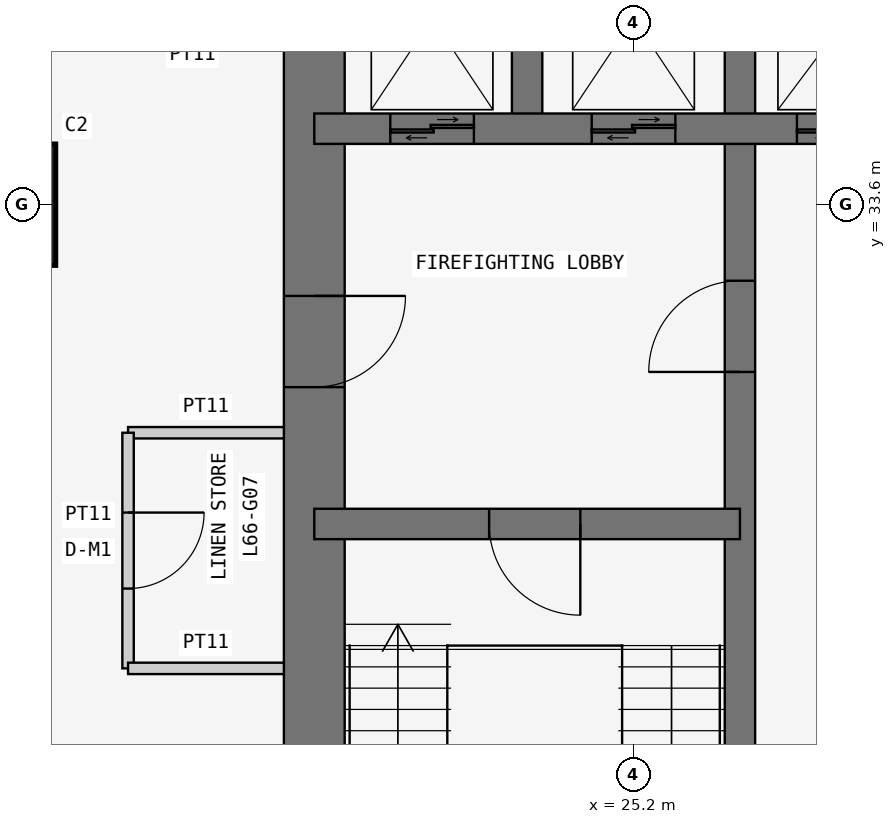
"""IFC4 building model, lengths in metres.
Left out: names, types, materials, properties, quantities, classifications, styles, units other than length and angle.
Written with IfcOpenShell. Run it as: python <this file> out.ifc"""

import sys

from ifc_helpers import new_model, si_unit, direction, frame, frame_2d, origin, origin_2d, place, context, subcontext, project, spatial, rectangle, extrude, element, fill, save


model = new_model("IFC4")
c1 = context("Model", 3, precision=1e-05, world=origin(), true_north=direction((0.0, 1.0)))
c2 = subcontext(c1, "Body", "Model", "MODEL_VIEW")
j1 = project(units=[si_unit("LENGTHUNIT", "METRE"), si_unit("PLANEANGLEUNIT", "RADIAN")], contexts=[c1])
p1 = place(None, origin())
s1 = spatial("IfcSite", under=j1, at=p1, CompositionType="ELEMENT")
p2 = place(p1, origin())
s2 = spatial("IfcBuilding", under=s1, at=p2, CompositionType="ELEMENT")
p3 = place(p2, frame((0.0, 0.0, 254.1)))
s3 = spatial("IfcBuildingStorey", under=s2, at=p3, CompositionType="ELEMENT", Elevation=254.1)
p4 = place(p3, frame((16.8, 33.6, 0.0), z_axis=(0.0, 0.0, 1.0), x_axis=(1.0, 0.0, 0.0)))
e1 = element("IfcColumn", 1, at=p4, inside=s3, PredefinedType="COLUMN", context=c2, shape_type="SweptSolid", body=[
    extrude(rectangle(XDim=1.6, YDim=1.6, at=origin_2d()), origin(), (0.0, 0.0, 1.0), 3.6),
])
p5 = place(p3, frame((21.0, 37.8, 0.0), z_axis=(0.0, 0.0, 1.0), x_axis=(0.0, -1.0, 0.0)))
e2 = element("IfcWall", 2, at=p5, inside=s3, PredefinedType="SHEAR", context=c2, shape_type="SweptSolid", body=[
    extrude(rectangle(XDim=17.2, YDim=0.8, at=frame_2d((8.6, 0.0))), origin(), (0.0, 0.0, 1.0), 3.6),
])
p6 = place(p5, frame((5.4, 0.0, 0.0)))
e3 = element("IfcOpeningElement", 3, at=p6, cuts=e2, PredefinedType="OPENING", context=c2, shape_type="SweptSolid", body=[
    extrude(rectangle(XDim=1.2, YDim=2.1, at=frame_2d((0.6, 1.05))), frame((0.0, 0.41, 0.0), z_axis=(0.0, -1.0, 0.0), x_axis=(1.0, 0.0, 0.0)), (0.0, 0.0, 1.0), 0.82),
])
p7 = place(p3, frame((26.6, 21.0, 0.0), z_axis=(0.0, 0.0, 1.0), x_axis=(0.0, 1.0, 0.0)))
e4 = element("IfcWall", 4, at=p7, inside=s3, PredefinedType="SHEAR", context=c2, shape_type="SweptSolid", body=[
    extrude(rectangle(XDim=16.8, YDim=0.4, at=frame_2d((8.4, 0.0))), origin(), (0.0, 0.0, 1.0), 3.6),
])
p8 = place(p7, frame((10.4, 0.0, 0.0)))
e5 = element("IfcOpeningElement", 5, at=p8, cuts=e4, PredefinedType="OPENING", context=c2, shape_type="SweptSolid", body=[
    extrude(rectangle(XDim=1.2, YDim=2.1, at=frame_2d((0.6, 1.05))), frame((0.0, 0.21, 0.0), z_axis=(0.0, -1.0, 0.0), x_axis=(1.0, 0.0, 0.0)), (0.0, 0.0, 1.0), 0.42),
])
p9 = place(p3, frame((21.0, 29.4, 0.0), z_axis=(0.0, 0.0, 1.0), x_axis=(1.0, 0.0, 0.0)))
e6 = element("IfcWall", 6, at=p9, inside=s3, PredefinedType="SHEAR", context=c2, shape_type="SweptSolid", body=[
    extrude(rectangle(XDim=5.6, YDim=0.4, at=frame_2d((2.8, 0.0))), origin(), (0.0, 0.0, 1.0), 3.6),
])
p10 = place(p9, frame((2.3, 0.0, 0.0)))
e7 = element("IfcOpeningElement", 7, at=p10, cuts=e6, PredefinedType="OPENING", context=c2, shape_type="SweptSolid", body=[
    extrude(rectangle(XDim=1.2, YDim=2.1, at=frame_2d((0.6, 1.05))), frame((0.0, 0.21, 0.0), z_axis=(0.0, -1.0, 0.0), x_axis=(1.0, 0.0, 0.0)), (0.0, 0.0, 1.0), 0.42),
])
p11 = place(p3, frame((21.0, 34.6, 0.0), z_axis=(0.0, 0.0, 1.0), x_axis=(1.0, 0.0, 0.0)))
e8 = element("IfcWall", 8, at=p11, inside=s3, PredefinedType="SHEAR", context=c2, shape_type="SweptSolid", body=[
    extrude(rectangle(XDim=11.2, YDim=0.4, at=frame_2d((5.6, 0.0))), origin(), (0.0, 0.0, 1.0), 3.6),
])
p12 = place(p11, frame((9.35, 0.0, 0.0)))
e9 = element("IfcOpeningElement", 9, at=p12, cuts=e8, PredefinedType="OPENING", context=c2, shape_type="SweptSolid", body=[
    extrude(rectangle(XDim=0.9, YDim=2.1, at=frame_2d((0.45, 1.05))), frame((0.0, 0.21, 0.0), z_axis=(0.0, -1.0, 0.0), x_axis=(1.0, 0.0, 0.0)), (0.0, 0.0, 1.0), 0.42),
])
p13 = place(p11, frame((1.0, 0.0, 0.0)))
e10 = element("IfcOpeningElement", 10, at=p13, cuts=e8, PredefinedType="OPENING", context=c2, shape_type="SweptSolid", body=[
    extrude(rectangle(XDim=1.1, YDim=2.1, at=frame_2d((0.55, 1.05))), frame((0.0, 0.21, 0.0), z_axis=(0.0, -1.0, 0.0), x_axis=(1.0, 0.0, 0.0)), (0.0, 0.0, 1.0), 0.42),
])
p14 = place(p11, frame((3.65, 0.0, 0.0)))
e11 = element("IfcOpeningElement", 11, at=p14, cuts=e8, PredefinedType="OPENING", context=c2, shape_type="SweptSolid", body=[
    extrude(rectangle(XDim=1.1, YDim=2.1, at=frame_2d((0.55, 1.05))), frame((0.0, 0.21, 0.0), z_axis=(0.0, -1.0, 0.0), x_axis=(1.0, 0.0, 0.0)), (0.0, 0.0, 1.0), 0.42),
])
p15 = place(p11, frame((6.35, 0.0, 0.0)))
e12 = element("IfcOpeningElement", 12, at=p15, cuts=e8, PredefinedType="OPENING", context=c2, shape_type="SweptSolid", body=[
    extrude(rectangle(XDim=1.3, YDim=2.1, at=frame_2d((0.65, 1.05))), frame((0.0, 0.21, 0.0), z_axis=(0.0, -1.0, 0.0), x_axis=(1.0, 0.0, 0.0)), (0.0, 0.0, 1.0), 0.42),
])
p16 = place(p3, frame((23.8, 34.6, 0.0), z_axis=(0.0, 0.0, 1.0), x_axis=(0.0, 1.0, 0.0)))
e13 = element("IfcWall", 13, at=p16, inside=s3, PredefinedType="SHEAR", context=c2, shape_type="SweptSolid", body=[
    extrude(rectangle(XDim=3.2, YDim=0.4, at=frame_2d((1.6, 0.0))), origin(), (0.0, 0.0, 1.0), 3.6),
])
p17 = place(p3, frame((20.6, 30.6, 0.0), z_axis=(0.0, 0.0, 1.0), x_axis=(-1.0, 0.0, 0.0)))
e14 = element("IfcWall", 14, at=p17, inside=s3, PredefinedType="PARTITIONING", context=c2, shape_type="SweptSolid", body=[
    extrude(rectangle(XDim=2.05, YDim=0.15, at=frame_2d((1.025, 0.0))), origin(), (0.0, 0.0, 1.0), 3.45),
])
p18 = place(p3, frame((18.55, 30.6, 0.0), z_axis=(0.0, 0.0, 1.0), x_axis=(0.0, -1.0, 0.0)))
e15 = element("IfcWall", 15, at=p18, inside=s3, PredefinedType="PARTITIONING", context=c2, shape_type="SweptSolid", body=[
    extrude(rectangle(XDim=3.1, YDim=0.15, at=frame_2d((1.55, 0.0))), origin(), (0.0, 0.0, 1.0), 3.45),
])
p19 = place(p18, frame((1.05, 0.0, 0.0)))
e16 = element("IfcOpeningElement", 16, at=p19, cuts=e15, PredefinedType="OPENING", context=c2, shape_type="SweptSolid", body=[
    extrude(rectangle(XDim=1.0, YDim=2.1, at=frame_2d((0.5, 1.05))), frame((0.0, 0.085, 0.0), z_axis=(0.0, -1.0, 0.0), x_axis=(1.0, 0.0, 0.0)), (0.0, 0.0, 1.0), 0.17),
])
p20 = place(p3, frame((18.55, 27.5, 0.0), z_axis=(0.0, 0.0, 1.0), x_axis=(1.0, 0.0, 0.0)))
e17 = element("IfcWall", 17, at=p20, inside=s3, PredefinedType="PARTITIONING", context=c2, shape_type="SweptSolid", body=[
    extrude(rectangle(XDim=2.05, YDim=0.15, at=frame_2d((1.025, 0.0))), origin(), (0.0, 0.0, 1.0), 3.45),
])
p21 = place(p19, origin())
e18 = element("IfcDoor", 18, at=p21, inside=s3, OperationType="SINGLE_SWING_LEFT", PredefinedType="DOOR", context=c2, shape_type="SweptSolid", body=[
    extrude(rectangle(XDim=1.0, YDim=2.1, at=frame_2d((0.5, 1.05))), frame((0.0, 0.025, 0.0), z_axis=(0.0, -1.0, 0.0), x_axis=(1.0, 0.0, 0.0)), (0.0, 0.0, 1.0), 0.05),
])
fill(e16, e18)
p22 = place(p6, origin())
e19 = element("IfcDoor", 19, at=p22, inside=s3, OperationType="SINGLE_SWING_LEFT", PredefinedType="DOOR", context=c2, shape_type="SweptSolid", body=[
    extrude(rectangle(XDim=1.2, YDim=2.1, at=frame_2d((0.6, 1.05))), frame((0.0, 0.025, 0.0), z_axis=(0.0, -1.0, 0.0), x_axis=(1.0, 0.0, 0.0)), (0.0, 0.0, 1.0), 0.05),
])
fill(e3, e19)
p23 = place(p10, frame((1.2, 0.0, 0.0), z_axis=(0.0, 0.0, 1.0), x_axis=(-1.0, 0.0, 0.0)))
e20 = element("IfcDoor", 20, at=p23, inside=s3, OperationType="SINGLE_SWING_LEFT", PredefinedType="DOOR", context=c2, shape_type="SweptSolid", body=[
    extrude(rectangle(XDim=1.2, YDim=2.1, at=frame_2d((0.6, 1.05))), frame((0.0, 0.025, 0.0), z_axis=(0.0, -1.0, 0.0), x_axis=(1.0, 0.0, 0.0)), (0.0, 0.0, 1.0), 0.05),
])
fill(e7, e20)
p24 = place(p8, origin())
e21 = element("IfcDoor", 21, at=p24, inside=s3, OperationType="SINGLE_SWING_LEFT", PredefinedType="DOOR", context=c2, shape_type="SweptSolid", body=[
    extrude(rectangle(XDim=1.2, YDim=2.1, at=frame_2d((0.6, 1.05))), frame((0.0, 0.025, 0.0), z_axis=(0.0, -1.0, 0.0), x_axis=(1.0, 0.0, 0.0)), (0.0, 0.0, 1.0), 0.05),
])
fill(e5, e21)
p25 = place(p13, origin())
e22 = element("IfcDoor", 22, at=p25, inside=s3, OperationType="DOUBLE_DOOR_SLIDING", PredefinedType="DOOR", context=c2, shape_type="SweptSolid", body=[
    extrude(rectangle(XDim=1.1, YDim=2.1, at=frame_2d((0.55, 1.05))), frame((0.0, 0.025, 0.0), z_axis=(0.0, -1.0, 0.0), x_axis=(1.0, 0.0, 0.0)), (0.0, 0.0, 1.0), 0.05),
])
fill(e10, e22)
p26 = place(p14, origin())
e23 = element("IfcDoor", 23, at=p26, inside=s3, OperationType="DOUBLE_DOOR_SLIDING", PredefinedType="DOOR", context=c2, shape_type="SweptSolid", body=[
    extrude(rectangle(XDim=1.1, YDim=2.1, at=frame_2d((0.55, 1.05))), frame((0.0, 0.025, 0.0), z_axis=(0.0, -1.0, 0.0), x_axis=(1.0, 0.0, 0.0)), (0.0, 0.0, 1.0), 0.05),
])
fill(e11, e23)
p27 = place(p15, origin())
e24 = element("IfcDoor", 24, at=p27, inside=s3, OperationType="DOUBLE_DOOR_SLIDING", PredefinedType="DOOR", context=c2, shape_type="SweptSolid", body=[
    extrude(rectangle(XDim=1.3, YDim=2.1, at=frame_2d((0.65, 1.05))), frame((0.0, 0.025, 0.0), z_axis=(0.0, -1.0, 0.0), x_axis=(1.0, 0.0, 0.0)), (0.0, 0.0, 1.0), 0.05),
])
fill(e12, e24)
save(model, sys.argv[1])
